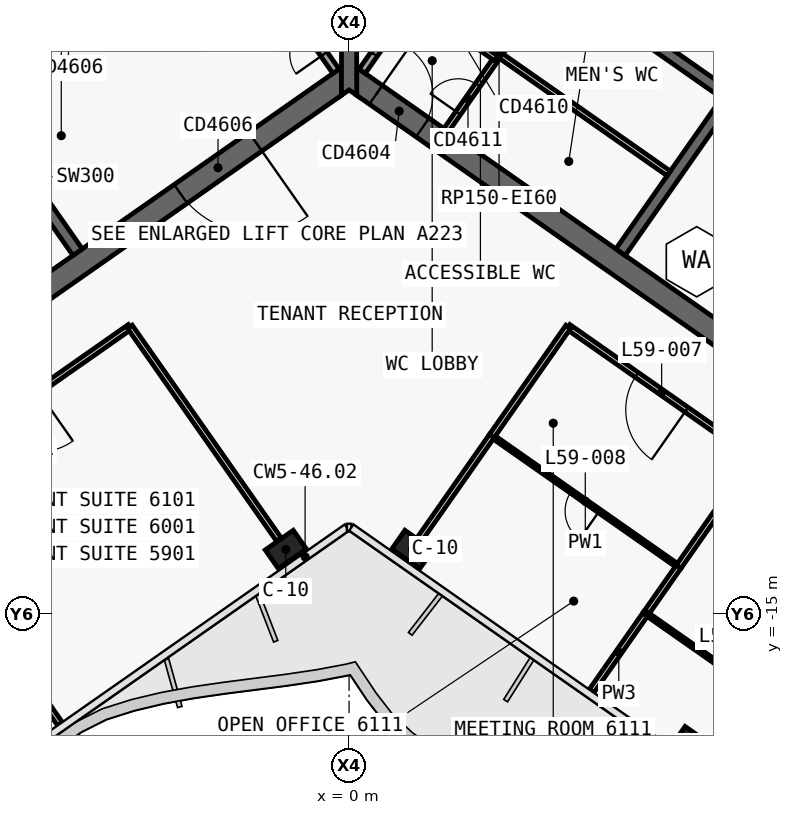
"""IFC4 building model, lengths in metres.
Left out: names, types, materials, properties, quantities, classifications, styles, units other than length and angle.
Written with IfcOpenShell. Run it as: python <this file> out.ifc"""

import sys

from ifc_helpers import new_model, si_unit, direction, frame, frame_2d, origin, origin_2d, place, context, subcontext, project, spatial, polyline, rectangle, outline, extrude, element, fill, save


model = new_model("IFC4")
c1 = context("Model", 3, precision=1e-05, world=origin(), true_north=direction((0.0, 1.0)))
c2 = subcontext(c1, "Body", "Model", "MODEL_VIEW")
j1 = project(units=[si_unit("LENGTHUNIT", "METRE"), si_unit("PLANEANGLEUNIT", "RADIAN")], contexts=[c1])
p1 = place(None, origin())
s1 = spatial("IfcSite", under=j1, at=p1, CompositionType="ELEMENT")
p2 = place(p1, origin())
s2 = spatial("IfcBuilding", under=s1, at=p2, CompositionType="ELEMENT")
p3 = place(p2, frame((0.0, 0.0, 252.7)))
s3 = spatial("IfcBuildingStorey", under=s2, at=p3, CompositionType="ELEMENT", Elevation=252.7)
p4 = place(p3, frame((-0.028, 12.066, 0.0), z_axis=(0.0, 0.0, 1.0), x_axis=(-0.819151382952, -0.573577380837, 0.0)))
e1 = element("IfcWall", 1, at=p4, inside=s3, PredefinedType="SHEAR", context=c2, shape_type="SweptSolid", body=[
    extrude(outline(polyline([(33.898, 0.3), (0.42, 0.3), (0.0, -0.3), (33.898, -0.3), (33.898, 0.3)])), origin(), (0.0, 0.0, 1.0), 3.9),
])
p5 = place(p3, frame((-0.028, -0.874, 0.0), z_axis=(0.0, 0.0, 1.0), x_axis=(-0.819150035022, -0.573579305871, 0.0)))
e2 = element("IfcWall", 2, at=p5, inside=s3, PredefinedType="SHEAR", context=c2, shape_type="SweptSolid", body=[
    extrude(outline(polyline([(26.476, 0.3), (0.42, 0.3), (0.0, -0.3), (26.476, -0.3), (26.476, 0.3)])), origin(), (0.0, 0.0, 1.0), 3.9),
])
p6 = place(p5, frame((2.976, 0.0, 0.0)))
e3 = element("IfcOpeningElement", 3, at=p6, cuts=e2, PredefinedType="OPENING", context=c2, shape_type="SweptSolid", body=[
    extrude(rectangle(XDim=2.4, YDim=2.1, at=frame_2d((1.2, 1.05))), frame((0.0, 0.31, 0.0), z_axis=(0.0, -1.0, 0.0), x_axis=(1.0, 0.0, 0.0)), (0.0, 0.0, 1.0), 0.62),
])
p7 = place(p5, frame((11.776, 0.0, 0.0)))
e4 = element("IfcOpeningElement", 4, at=p7, cuts=e2, PredefinedType="OPENING", context=c2, shape_type="SweptSolid", body=[
    extrude(rectangle(XDim=2.4, YDim=2.1, at=frame_2d((1.2, 1.05))), frame((0.0, 0.31, 0.0), z_axis=(0.0, -1.0, 0.0), x_axis=(1.0, 0.0, 0.0)), (0.0, 0.0, 1.0), 0.62),
])
p8 = place(p3, frame((-7.143, -5.49, 0.0), z_axis=(0.0, 0.0, 1.0), x_axis=(-0.573617744349, 0.819123118565, 0.0)))
e5 = element("IfcWall", 5, at=p8, inside=s3, PredefinedType="SHEAR", context=c2, shape_type="SweptSolid", body=[
    extrude(outline(polyline([(4.85, 0.15), (0.0, 0.15), (0.0, -0.15), (4.85, -0.15), (4.85, 0.15)])), origin(), (0.0, 0.0, 1.0), 3.9),
])
p9 = place(p3, frame((-2.638, 3.768, 0.0), z_axis=(0.0, 0.0, 1.0), x_axis=(-0.819155014212, -0.573572194837, 0.0)))
e6 = element("IfcWall", 6, at=p9, inside=s3, PredefinedType="SHEAR", context=c2, shape_type="SweptSolid", body=[
    extrude(outline(polyline([(26.4, 0.15), (0.0, 0.15), (0.0, -0.15), (26.4, -0.15), (26.4, 0.15)])), origin(), (0.0, 0.0, 1.0), 3.9),
])
p10 = place(p9, frame((1.169, 0.0, 0.0)))
e7 = element("IfcOpeningElement", 7, at=p10, cuts=e6, PredefinedType="OPENING", context=c2, shape_type="SweptSolid", body=[
    extrude(rectangle(XDim=1.1, YDim=2.1, at=frame_2d((0.55, 1.05))), frame((0.0, 0.16, 0.0), z_axis=(0.0, -1.0, 0.0), x_axis=(1.0, 0.0, 0.0)), (0.0, 0.0, 1.0), 0.32),
])
p11 = place(p9, frame((3.206, 0.0, 0.0)))
e8 = element("IfcOpeningElement", 8, at=p11, cuts=e6, PredefinedType="OPENING", context=c2, shape_type="SweptSolid", body=[
    extrude(rectangle(XDim=1.1, YDim=2.1, at=frame_2d((0.55, 1.05))), frame((0.0, 0.16, 0.0), z_axis=(0.0, -1.0, 0.0), x_axis=(1.0, 0.0, 0.0)), (0.0, 0.0, 1.0), 0.32),
])
p12 = place(p9, frame((5.244, 0.0, 0.0)))
e9 = element("IfcOpeningElement", 9, at=p12, cuts=e6, PredefinedType="OPENING", context=c2, shape_type="SweptSolid", body=[
    extrude(rectangle(XDim=1.1, YDim=2.1, at=frame_2d((0.55, 1.05))), frame((0.0, 0.16, 0.0), z_axis=(0.0, -1.0, 0.0), x_axis=(1.0, 0.0, 0.0)), (0.0, 0.0, 1.0), 0.32),
])
p13 = place(p9, frame((7.281, 0.0, 0.0)))
e10 = element("IfcOpeningElement", 10, at=p13, cuts=e6, PredefinedType="OPENING", context=c2, shape_type="SweptSolid", body=[
    extrude(rectangle(XDim=1.1, YDim=2.1, at=frame_2d((0.55, 1.05))), frame((0.0, 0.16, 0.0), z_axis=(0.0, -1.0, 0.0), x_axis=(1.0, 0.0, 0.0)), (0.0, 0.0, 1.0), 0.32),
])
p14 = place(p9, frame((9.688, 0.0, 0.0)))
e11 = element("IfcOpeningElement", 11, at=p14, cuts=e6, PredefinedType="OPENING", context=c2, shape_type="SweptSolid", body=[
    extrude(rectangle(XDim=1.1, YDim=2.1, at=frame_2d((0.55, 1.05))), frame((0.0, 0.16, 0.0), z_axis=(0.0, -1.0, 0.0), x_axis=(1.0, 0.0, 0.0)), (0.0, 0.0, 1.0), 0.32),
])
p15 = place(p9, frame((11.863, 0.0, 0.0)))
e12 = element("IfcOpeningElement", 12, at=p15, cuts=e6, PredefinedType="OPENING", context=c2, shape_type="SweptSolid", body=[
    extrude(rectangle(XDim=1.1, YDim=2.1, at=frame_2d((0.55, 1.05))), frame((0.0, 0.16, 0.0), z_axis=(0.0, -1.0, 0.0), x_axis=(1.0, 0.0, 0.0)), (0.0, 0.0, 1.0), 0.32),
])
p16 = place(p9, frame((15.175, 0.0, 0.0)))
e13 = element("IfcOpeningElement", 13, at=p16, cuts=e6, PredefinedType="OPENING", context=c2, shape_type="SweptSolid", body=[
    extrude(rectangle(XDim=1.0, YDim=2.1, at=frame_2d((0.5, 1.05))), frame((0.0, 0.16, 0.0), z_axis=(0.0, -1.0, 0.0), x_axis=(1.0, 0.0, 0.0)), (0.0, 0.0, 1.0), 0.32),
])
p17 = place(p3, frame((0.028, 12.066, 0.0), z_axis=(0.0, 0.0, 1.0), x_axis=(0.819151382952, -0.573577380837, 0.0)))
e14 = element("IfcWall", 14, at=p17, inside=s3, PredefinedType="SHEAR", context=c2, shape_type="SweptSolid", body=[
    extrude(outline(polyline([(33.898, 0.3), (0.0, 0.3), (0.42, -0.3), (33.898, -0.3), (33.898, 0.3)])), origin(), (0.0, 0.0, 1.0), 3.9),
])
p18 = place(p3, frame((0.028, -0.874, 0.0), z_axis=(0.0, 0.0, 1.0), x_axis=(0.819150035022, -0.573579305871, 0.0)))
e15 = element("IfcWall", 15, at=p18, inside=s3, PredefinedType="SHEAR", context=c2, shape_type="SweptSolid", body=[
    extrude(outline(polyline([(26.476, 0.3), (0.0, 0.3), (0.42, -0.3), (26.476, -0.3), (26.476, 0.3)])), origin(), (0.0, 0.0, 1.0), 3.9),
])
p19 = place(p18, frame((0.826, 0.0, 0.0)))
e16 = element("IfcOpeningElement", 16, at=p19, cuts=e15, PredefinedType="OPENING", context=c2, shape_type="SweptSolid", body=[
    extrude(rectangle(XDim=1.5, YDim=2.1, at=frame_2d((0.75, 1.05))), frame((0.0, 0.31, 0.0), z_axis=(0.0, -1.0, 0.0), x_axis=(1.0, 0.0, 0.0)), (0.0, 0.0, 1.0), 0.62),
])
p20 = place(p18, frame((12.226, 0.0, 0.0)))
e17 = element("IfcOpeningElement", 17, at=p20, cuts=e15, PredefinedType="OPENING", context=c2, shape_type="SweptSolid", body=[
    extrude(rectangle(XDim=1.5, YDim=2.1, at=frame_2d((0.75, 1.05))), frame((0.0, 0.31, 0.0), z_axis=(0.0, -1.0, 0.0), x_axis=(1.0, 0.0, 0.0)), (0.0, 0.0, 1.0), 0.62),
])
p21 = place(p3, frame((7.143, -5.49, 0.0), z_axis=(0.0, 0.0, 1.0), x_axis=(0.573617744349, 0.819123118565, 0.0)))
e18 = element("IfcWall", 18, at=p21, inside=s3, PredefinedType="SHEAR", context=c2, shape_type="SweptSolid", body=[
    extrude(outline(polyline([(0.0, 0.15), (0.0, -0.15), (4.85, -0.15), (4.85, 0.15), (0.0, 0.15)])), origin(), (0.0, 0.0, 1.0), 3.9),
])
p22 = place(p3, frame((2.638, 3.768, 0.0), z_axis=(0.0, 0.0, 1.0), x_axis=(0.819155014212, -0.573572194837, 0.0)))
e19 = element("IfcWall", 19, at=p22, inside=s3, PredefinedType="SHEAR", context=c2, shape_type="SweptSolid", body=[
    extrude(outline(polyline([(0.0, 0.15), (0.0, -0.15), (26.4, -0.15), (26.4, 0.15), (0.0, 0.15)])), origin(), (0.0, 0.0, 1.0), 3.9),
])
p23 = place(p22, frame((9.637, 0.0, 0.0)))
e20 = element("IfcOpeningElement", 20, at=p23, cuts=e19, PredefinedType="OPENING", context=c2, shape_type="SweptSolid", body=[
    extrude(rectangle(XDim=1.2, YDim=2.1, at=frame_2d((0.6, 1.05))), frame((0.0, 0.16, 0.0), z_axis=(0.0, -1.0, 0.0), x_axis=(1.0, 0.0, 0.0)), (0.0, 0.0, 1.0), 0.32),
])
p24 = place(p22, frame((11.812, 0.0, 0.0)))
e21 = element("IfcOpeningElement", 21, at=p24, cuts=e19, PredefinedType="OPENING", context=c2, shape_type="SweptSolid", body=[
    extrude(rectangle(XDim=1.2, YDim=2.1, at=frame_2d((0.6, 1.05))), frame((0.0, 0.16, 0.0), z_axis=(0.0, -1.0, 0.0), x_axis=(1.0, 0.0, 0.0)), (0.0, 0.0, 1.0), 0.32),
])
p25 = place(p22, frame((13.988, 0.0, 0.0)))
e22 = element("IfcOpeningElement", 22, at=p25, cuts=e19, PredefinedType="OPENING", context=c2, shape_type="SweptSolid", body=[
    extrude(rectangle(XDim=1.2, YDim=2.1, at=frame_2d((0.6, 1.05))), frame((0.0, 0.16, 0.0), z_axis=(0.0, -1.0, 0.0), x_axis=(1.0, 0.0, 0.0)), (0.0, 0.0, 1.0), 0.32),
])
p26 = place(p22, frame((16.262, 0.0, 0.0)))
e23 = element("IfcOpeningElement", 23, at=p26, cuts=e19, PredefinedType="OPENING", context=c2, shape_type="SweptSolid", body=[
    extrude(rectangle(XDim=1.0, YDim=2.1, at=frame_2d((0.5, 1.05))), frame((0.0, 0.16, 0.0), z_axis=(0.0, -1.0, 0.0), x_axis=(1.0, 0.0, 0.0)), (0.0, 0.0, 1.0), 0.32),
])
p27 = place(p3, frame((0.0, -1.361, 0.0), z_axis=(0.0, 0.0, 1.0), x_axis=(0.0, 1.0, 0.0)))
e24 = element("IfcWall", 24, at=p27, inside=s3, PredefinedType="SHEAR", context=c2, shape_type="SweptSolid", body=[
    extrude(outline(polyline([(0.14, 0.2), (0.0, 0.2), (0.14, 0.0), (0.0, -0.2), (0.14, -0.2), (1.012, -0.2), (12.94, -0.2), (13.813, -0.2), (13.893, -0.2), (13.933, -0.172), (13.813, 0.0), (13.933, 0.172), (13.893, 0.2), (13.813, 0.2), (12.94, 0.2), (1.012, 0.2), (0.14, 0.2)])), origin(), (0.0, 0.0, 1.0), 3.9),
])
for number, where, z_axis, x_axis in (
    (25, (-1.665, -13.313, 0.0), (0.0, 0.0, 1.0), (-0.819, -0.574, 0.0)),
    (26, (1.665, -13.313, 0.0), (0.0, 0.0, 1.0), (0.819, -0.574, 0.0)),
    (27, (9.038, -18.475, 0.0), (0.0, 0.0, 1.0), (0.819, -0.574, 0.0)),
):
    element("IfcColumn", number, at=place(p3, frame(where, z_axis=z_axis, x_axis=x_axis)), inside=s3, PredefinedType="COLUMN", context=c2, shape_type="SweptSolid", body=[
        extrude(rectangle(XDim=0.9, YDim=0.6, at=origin_2d()), origin(), (0.0, 0.0, 1.0), 3.9),
    ])
p28 = place(p3, frame((2.556, -2.278, 0.0), z_axis=(0.0, 0.0, 1.0), x_axis=(0.573560315113, 0.819163332265, 0.0)))
e28 = element("IfcWall", 28, at=p28, inside=s3, PredefinedType="PARTITIONING", context=c2, shape_type="SweptSolid", body=[
    extrude(rectangle(XDim=4.85, YDim=0.15, at=frame_2d((2.425, 0.0))), origin(), (0.0, 0.0, 1.0), 3.62),
])
p29 = place(p28, frame((0.55, 0.0, 0.0)))
e29 = element("IfcOpeningElement", 29, at=p29, cuts=e28, PredefinedType="OPENING", context=c2, shape_type="SweptSolid", body=[
    extrude(rectangle(XDim=0.9, YDim=2.1, at=frame_2d((0.45, 1.05))), frame((0.0, 0.085, 0.0), z_axis=(0.0, -1.0, 0.0), x_axis=(1.0, 0.0, 0.0)), (0.0, 0.0, 1.0), 0.17),
])
p30 = place(p28, frame((3.075, 0.0, 0.0)))
e30 = element("IfcOpeningElement", 30, at=p30, cuts=e28, PredefinedType="OPENING", context=c2, shape_type="SweptSolid", body=[
    extrude(rectangle(XDim=0.9, YDim=2.1, at=frame_2d((0.45, 1.05))), frame((0.0, 0.085, 0.0), z_axis=(0.0, -1.0, 0.0), x_axis=(1.0, 0.0, 0.0)), (0.0, 0.0, 1.0), 0.17),
])
p31 = place(p3, frame((1.745, 1.097, 0.0), z_axis=(0.0, 0.0, 1.0), x_axis=(0.819178980414, -0.573537965655, 0.0)))
e31 = element("IfcWall", 31, at=p31, inside=s3, PredefinedType="PARTITIONING", context=c2, shape_type="SweptSolid", body=[
    extrude(rectangle(XDim=2.6, YDim=0.15, at=frame_2d((1.3, 0.0))), origin(), (0.0, 0.0, 1.0), 3.62),
])
p32 = place(p31, frame((0.85, 0.0, 0.0)))
e32 = element("IfcOpeningElement", 32, at=p32, cuts=e31, PredefinedType="OPENING", context=c2, shape_type="SweptSolid", body=[
    extrude(rectangle(XDim=0.9, YDim=2.1, at=frame_2d((0.45, 1.05))), frame((0.0, 0.085, 0.0), z_axis=(0.0, -1.0, 0.0), x_axis=(1.0, 0.0, 0.0)), (0.0, 0.0, 1.0), 0.17),
])
p33 = place(p3, frame((3.947, -0.292, 0.0), z_axis=(0.0, 0.0, 1.0), x_axis=(0.819151939971, -0.573576585332, 0.0)))
e33 = element("IfcWall", 33, at=p33, inside=s3, PredefinedType="PARTITIONING", context=c2, shape_type="SweptSolid", body=[
    extrude(rectangle(XDim=5.45, YDim=0.15, at=frame_2d((2.725, 0.0))), origin(), (0.0, 0.0, 1.0), 3.62),
])
p34 = place(p3, frame((-0.344, -0.729, 0.0), z_axis=(0.0, 0.0, 1.0), x_axis=(-0.573560315113, 0.819163332265, 0.0)))
e34 = element("IfcWall", 34, at=p34, inside=s3, PredefinedType="SOLIDWALL", context=c2, shape_type="SweptSolid", body=[
    extrude(rectangle(XDim=4.85, YDim=0.2, at=frame_2d((2.425, 0.0))), origin(), (0.0, 0.0, 1.0), 3.62),
])
p35 = place(p34, frame((0.55, 0.0, 0.0)))
e35 = element("IfcOpeningElement", 35, at=p35, cuts=e34, PredefinedType="OPENING", context=c2, shape_type="SweptSolid", body=[
    extrude(rectangle(XDim=0.9, YDim=2.1, at=frame_2d((0.45, 1.05))), frame((0.0, 0.11, 0.0), z_axis=(0.0, -1.0, 0.0), x_axis=(1.0, 0.0, 0.0)), (0.0, 0.0, 1.0), 0.22),
])
p36 = place(p3, frame((0.344, -0.729, 0.0), z_axis=(0.0, 0.0, 1.0), x_axis=(0.573560315113, 0.819163332265, 0.0)))
e36 = element("IfcWall", 36, at=p36, inside=s3, PredefinedType="SOLIDWALL", context=c2, shape_type="SweptSolid", body=[
    extrude(rectangle(XDim=4.85, YDim=0.2, at=frame_2d((2.425, 0.0))), origin(), (0.0, 0.0, 1.0), 3.62),
])
p37 = place(p36, frame((0.55, 0.0, 0.0)))
e37 = element("IfcOpeningElement", 37, at=p37, cuts=e36, PredefinedType="OPENING", context=c2, shape_type="SweptSolid", body=[
    extrude(rectangle(XDim=0.9, YDim=2.1, at=frame_2d((0.45, 1.05))), frame((0.0, 0.11, 0.0), z_axis=(0.0, -1.0, 0.0), x_axis=(1.0, 0.0, 0.0)), (0.0, 0.0, 1.0), 0.22),
])
p38 = place(p3, frame((10.683, -10.898, 0.0), z_axis=(0.0, 0.0, 1.0), x_axis=(-0.819147828287, 0.573582457378, 0.0)))
e38 = element("IfcWall", 38, at=p38, inside=s3, PredefinedType="PARTITIONING", context=c2, shape_type="SweptSolid", body=[
    extrude(rectangle(XDim=6.002, YDim=0.15, at=frame_2d((3.001, 0.0))), origin(), (0.0, 0.0, 1.0), 3.05),
])
p39 = place(p38, frame((2.201, 0.0, 0.0)))
e39 = element("IfcOpeningElement", 39, at=p39, cuts=e38, PredefinedType="OPENING", context=c2, shape_type="SweptSolid", body=[
    extrude(rectangle(XDim=1.6, YDim=2.1, at=frame_2d((0.8, 1.05))), frame((0.0, 0.085, 0.0), z_axis=(0.0, -1.0, 0.0), x_axis=(1.0, 0.0, 0.0)), (0.0, 0.0, 1.0), 0.17),
])
p40 = place(p3, frame((-5.766, -7.456, 0.0), z_axis=(0.0, 0.0, 1.0), x_axis=(-0.819150881364, -0.573578097177, 0.0)))
e40 = element("IfcWall", 40, at=p40, inside=s3, PredefinedType="PARTITIONING", context=c2, shape_type="SweptSolid", body=[
    extrude(rectangle(XDim=7.502, YDim=0.15, at=frame_2d((3.751, 0.0))), origin(), (0.0, 0.0, 1.0), 3.05),
])
p41 = place(p40, frame((2.951, 0.0, 0.0)))
e41 = element("IfcOpeningElement", 41, at=p41, cuts=e40, PredefinedType="OPENING", context=c2, shape_type="SweptSolid", body=[
    extrude(rectangle(XDim=1.6, YDim=2.1, at=frame_2d((0.8, 1.05))), frame((0.0, 0.085, 0.0), z_axis=(0.0, -1.0, 0.0), x_axis=(1.0, 0.0, 0.0)), (0.0, 0.0, 1.0), 0.17),
])
p42 = place(p3, frame((8.673, -13.765, 0.0), z_axis=(0.0, 0.0, 1.0), x_axis=(-0.819149710902, 0.573579768758, 0.0)))
e42 = element("IfcWall", 42, at=p42, inside=s3, PredefinedType="PARTITIONING", context=c2, shape_type="SweptSolid", body=[
    extrude(rectangle(XDim=6.0, YDim=0.1, at=frame_2d((3.0, 0.0))), origin(), (0.0, 0.0, 1.0), 3.05),
])
p43 = place(p42, frame((2.55, 0.0, 0.0)))
e43 = element("IfcOpeningElement", 43, at=p43, cuts=e42, PredefinedType="OPENING", context=c2, shape_type="SweptSolid", body=[
    extrude(rectangle(XDim=0.9, YDim=2.1, at=frame_2d((0.45, 1.05))), frame((0.0, 0.06, 0.0), z_axis=(0.0, -1.0, 0.0), x_axis=(1.0, 0.0, 0.0)), (0.0, 0.0, 1.0), 0.12),
])
p44 = place(p3, frame((7.814, -14.992, 0.0), z_axis=(0.0, 0.0, 1.0), x_axis=(-0.57356715775, -0.819158541157, 0.0)))
e44 = element("IfcWall", 44, at=p44, inside=s3, PredefinedType="PARTITIONING", context=c2, shape_type="SweptSolid", body=[
    extrude(rectangle(XDim=2.501, YDim=0.15, at=frame_2d((1.25, 0.0))), origin(), (0.0, 0.0, 1.0), 3.0),
])
p45 = place(p3, frame((8.673, -13.765, 0.0), z_axis=(0.0, 0.0, 1.0), x_axis=(-0.573549676934, -0.819170780783, 0.0)))
e45 = element("IfcWall", 45, at=p45, inside=s3, PredefinedType="PARTITIONING", context=c2, shape_type="SweptSolid", body=[
    extrude(rectangle(XDim=1.501, YDim=0.15, at=frame_2d((0.75, 0.0))), origin(), (0.0, 0.0, 1.0), 3.62),
])
p46 = place(p3, frame((1.849, -13.051, 0.0), z_axis=(0.0, 0.0, 1.0), x_axis=(0.573595235521, 0.819138880647, 0.0)))
e46 = element("IfcWall", 46, at=p46, inside=s3, PredefinedType="PARTITIONING", context=c2, shape_type="SweptSolid", body=[
    extrude(rectangle(XDim=3.329, YDim=0.15, at=frame_2d((1.665, 0.0))), origin(), (0.0, 0.0, 1.0), 3.05),
])
p47 = place(p3, frame((10.681, -10.897, 0.0), z_axis=(0.0, 0.0, 1.0), x_axis=(-0.573612130335, -0.819127049933, 0.0)))
e47 = element("IfcWall", 47, at=p47, inside=s3, PredefinedType="PARTITIONING", context=c2, shape_type="SweptSolid", body=[
    extrude(rectangle(XDim=3.5, YDim=0.15, at=frame_2d((1.75, 0.0))), origin(), (0.0, 0.0, 1.0), 3.62),
])
p48 = place(p3, frame((3.759, -10.323, 0.0), z_axis=(0.0, 0.0, 1.0), x_axis=(0.573598101901, 0.81913687348, 0.0)))
e48 = element("IfcWall", 48, at=p48, inside=s3, PredefinedType="PARTITIONING", context=c2, shape_type="SweptSolid", body=[
    extrude(rectangle(XDim=3.5, YDim=0.15, at=frame_2d((1.75, 0.0))), origin(), (0.0, 0.0, 1.0), 3.05),
])
p49 = place(p3, frame((12.728, -18.435, 0.0), z_axis=(0.0, 0.0, 1.0), x_axis=(-0.819163097304, 0.573560650686, 0.0)))
e49 = element("IfcWall", 49, at=p49, inside=s3, PredefinedType="PARTITIONING", context=c2, shape_type="SweptSolid", body=[
    extrude(rectangle(XDim=6.0, YDim=0.1, at=frame_2d((3.0, 0.0))), origin(), (0.0, 0.0, 1.0), 3.05),
])
p50 = place(p49, frame((2.55, 0.0, 0.0)))
e50 = element("IfcOpeningElement", 50, at=p50, cuts=e49, PredefinedType="OPENING", context=c2, shape_type="SweptSolid", body=[
    extrude(rectangle(XDim=0.9, YDim=2.1, at=frame_2d((0.45, 1.05))), frame((0.0, 0.06, 0.0), z_axis=(0.0, -1.0, 0.0), x_axis=(1.0, 0.0, 0.0)), (0.0, 0.0, 1.0), 0.12),
])
p51 = place(p3, frame((-1.849, -13.051, 0.0), z_axis=(0.0, 0.0, 1.0), x_axis=(-0.57357985571, 0.819149650018, 0.0)))
e51 = element("IfcWall", 51, at=p51, inside=s3, PredefinedType="PARTITIONING", context=c2, shape_type="SweptSolid", body=[
    extrude(rectangle(XDim=6.832, YDim=0.15, at=frame_2d((3.416, 0.0))), origin(), (0.0, 0.0, 1.0), 3.05),
])
p52 = place(p3, frame((-7.608, -17.901, 0.0), z_axis=(0.0, 0.0, 1.0), x_axis=(-0.573560650686, 0.819163097304, 0.0)))
e52 = element("IfcWall", 52, at=p52, inside=s3, PredefinedType="PARTITIONING", context=c2, shape_type="SweptSolid", body=[
    extrude(rectangle(XDim=7.5, YDim=0.15, at=frame_2d((3.75, 0.0))), origin(), (0.0, 0.0, 1.0), 3.0),
])
p53 = place(p6, origin())
e53 = element("IfcDoor", 53, at=p53, inside=s3, OperationType="DOUBLE_DOOR_SINGLE_SWING", PredefinedType="DOOR", context=c2, shape_type="SweptSolid", body=[
    extrude(rectangle(XDim=2.4, YDim=2.1, at=frame_2d((1.2, 1.05))), frame((0.0, 0.025, 0.0), z_axis=(0.0, -1.0, 0.0), x_axis=(1.0, 0.0, 0.0)), (0.0, 0.0, 1.0), 0.05),
])
fill(e3, e53)
p54 = place(p29, origin())
e54 = element("IfcDoor", 54, at=p54, inside=s3, OperationType="SINGLE_SWING_RIGHT", PredefinedType="DOOR", context=c2, shape_type="SweptSolid", body=[
    extrude(rectangle(XDim=0.9, YDim=2.1, at=frame_2d((0.45, 1.05))), frame((0.0, 0.025, 0.0), z_axis=(0.0, -1.0, 0.0), x_axis=(1.0, 0.0, 0.0)), (0.0, 0.0, 1.0), 0.05),
])
fill(e29, e54)
p55 = place(p19, origin())
e55 = element("IfcDoor", 55, at=p55, inside=s3, OperationType="SINGLE_SWING_RIGHT", PredefinedType="DOOR", context=c2, shape_type="SweptSolid", body=[
    extrude(rectangle(XDim=1.5, YDim=2.1, at=frame_2d((0.75, 1.05))), frame((0.0, 0.025, 0.0), z_axis=(0.0, -1.0, 0.0), x_axis=(1.0, 0.0, 0.0)), (0.0, 0.0, 1.0), 0.05),
])
fill(e16, e55)
p56 = place(p35, origin())
e56 = element("IfcDoor", 56, at=p56, inside=s3, OperationType="SINGLE_SWING_RIGHT", PredefinedType="DOOR", context=c2, shape_type="SweptSolid", body=[
    extrude(rectangle(XDim=0.9, YDim=2.1, at=frame_2d((0.45, 1.05))), frame((0.0, 0.025, 0.0), z_axis=(0.0, -1.0, 0.0), x_axis=(1.0, 0.0, 0.0)), (0.0, 0.0, 1.0), 0.05),
])
fill(e35, e56)
p57 = place(p37, origin())
e57 = element("IfcDoor", 57, at=p57, inside=s3, OperationType="SINGLE_SWING_RIGHT", PredefinedType="DOOR", context=c2, shape_type="SweptSolid", body=[
    extrude(rectangle(XDim=0.9, YDim=2.1, at=frame_2d((0.45, 1.05))), frame((0.0, 0.025, 0.0), z_axis=(0.0, -1.0, 0.0), x_axis=(1.0, 0.0, 0.0)), (0.0, 0.0, 1.0), 0.05),
])
fill(e37, e57)
p58 = place(p39, origin())
e58 = element("IfcDoor", 58, at=p58, inside=s3, OperationType="DOUBLE_DOOR_SINGLE_SWING", PredefinedType="DOOR", context=c2, shape_type="SweptSolid", body=[
    extrude(rectangle(XDim=1.6, YDim=2.1, at=frame_2d((0.8, 1.05))), frame((0.0, 0.025, 0.0), z_axis=(0.0, -1.0, 0.0), x_axis=(1.0, 0.0, 0.0)), (0.0, 0.0, 1.0), 0.05),
])
fill(e39, e58)
p59 = place(p43, origin())
e59 = element("IfcDoor", 59, at=p59, inside=s3, OperationType="SINGLE_SWING_RIGHT", PredefinedType="DOOR", context=c2, shape_type="SweptSolid", body=[
    extrude(rectangle(XDim=0.9, YDim=2.1, at=frame_2d((0.45, 1.05))), frame((0.0, 0.025, 0.0), z_axis=(0.0, -1.0, 0.0), x_axis=(1.0, 0.0, 0.0)), (0.0, 0.0, 1.0), 0.05),
])
fill(e43, e59)
save(model, sys.argv[1])
